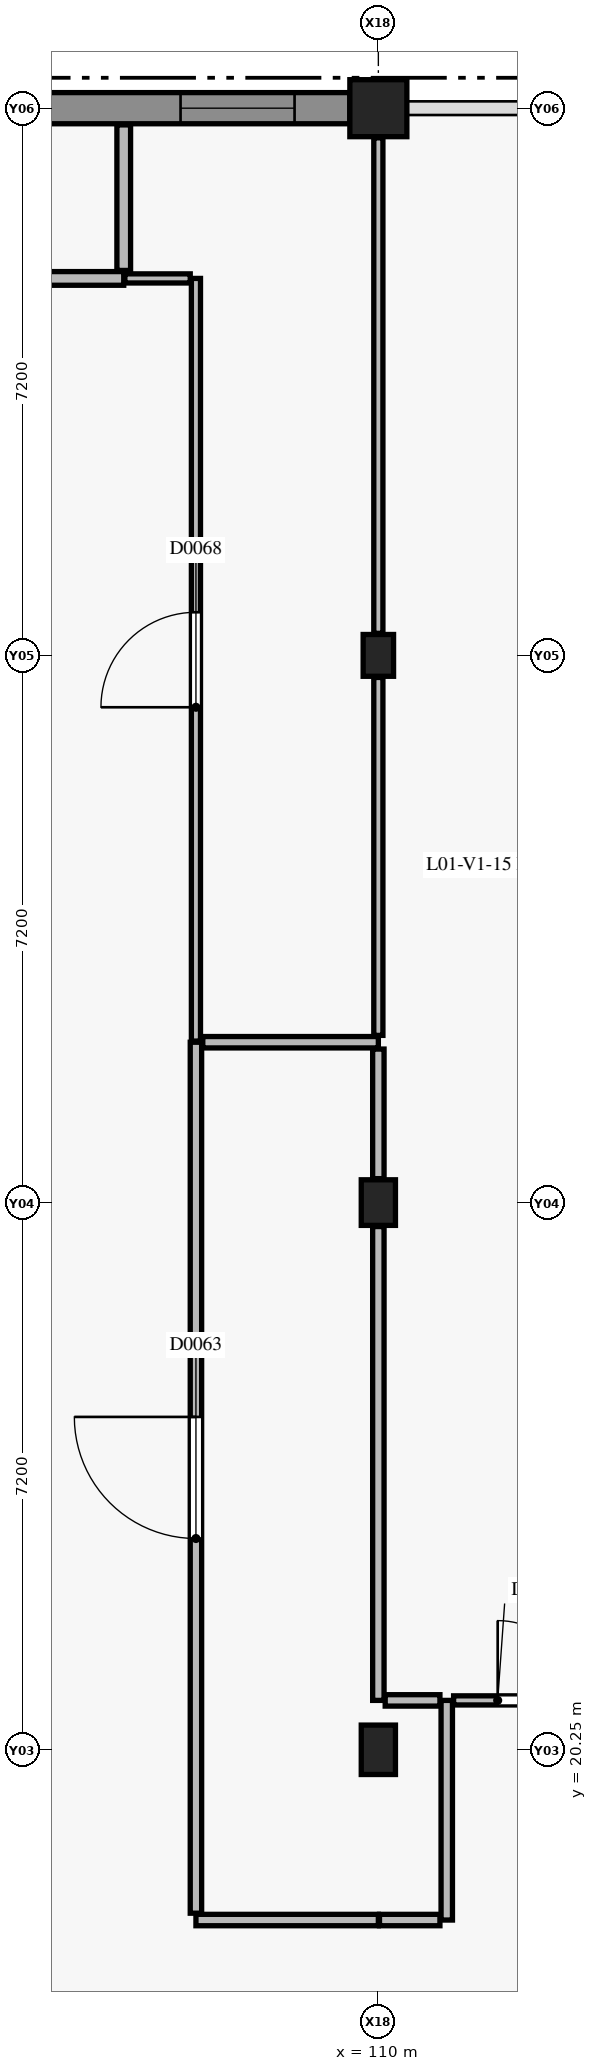
"""IFC4 building model, lengths in metres.
Left out: names, types, materials, properties, quantities, classifications, styles, units other than length and angle.
Written with IfcOpenShell. Run it as: python <this file> out.ifc"""

import sys

from ifc_helpers import new_model, si_unit, direction, frame, frame_2d, origin, origin_2d, place, context, subcontext, project, spatial, rectangle, extrude, element, fill, save


model = new_model("IFC4")
c1 = context("Model", 3, precision=1e-05, world=origin(), true_north=direction((0.0, 1.0)))
c2 = subcontext(c1, "Body", "Model", "MODEL_VIEW")
j1 = project(units=[si_unit("LENGTHUNIT", "METRE"), si_unit("PLANEANGLEUNIT", "RADIAN")], contexts=[c1])
p1 = place(None, origin())
s1 = spatial("IfcSite", under=j1, at=p1, CompositionType="ELEMENT")
p2 = place(p1, origin())
s2 = spatial("IfcBuilding", under=s1, at=p2, CompositionType="ELEMENT")
p3 = place(p2, frame((0.0, 0.0, 4.8)))
s3 = spatial("IfcBuildingStorey", under=s2, at=p3, CompositionType="ELEMENT", Elevation=4.8)
p4 = place(p3, frame((110.0, 20.25, 0.0), z_axis=(0.0, 0.0, 1.0), x_axis=(1.0, 0.0, 0.0)))
e1 = element("IfcColumn", 1, at=p4, inside=s3, PredefinedType="COLUMN", context=c2, shape_type="SweptSolid", body=[
    extrude(rectangle(XDim=0.45, YDim=0.65, at=origin_2d()), origin(), (0.0, 0.0, 1.0), 4.05),
])
p5 = place(p3, frame((110.0, 27.45, 0.0), z_axis=(0.0, 0.0, 1.0), x_axis=(1.0, 0.0, 0.0)))
e2 = element("IfcColumn", 2, at=p5, inside=s3, PredefinedType="COLUMN", context=c2, shape_type="SweptSolid", body=[
    extrude(rectangle(XDim=0.45, YDim=0.6, at=origin_2d()), origin(), (0.0, 0.0, 1.0), 4.05),
])
p6 = place(p3, frame((110.0, 34.65, 0.0), z_axis=(0.0, 0.0, 1.0), x_axis=(1.0, 0.0, 0.0)))
e3 = element("IfcColumn", 3, at=p6, inside=s3, PredefinedType="COLUMN", context=c2, shape_type="SweptSolid", body=[
    extrude(rectangle(XDim=0.4, YDim=0.55, at=origin_2d()), origin(), (0.0, 0.0, 1.0), 4.05),
])
p7 = place(p3, frame((110.0, 41.85, 0.0), z_axis=(0.0, 0.0, 1.0), x_axis=(1.0, 0.0, 0.0)))
e4 = element("IfcColumn", 4, at=p7, inside=s3, PredefinedType="COLUMN", context=c2, shape_type="SweptSolid", body=[
    extrude(rectangle(XDim=0.75, YDim=0.75, at=origin_2d()), origin(), (0.0, 0.0, 1.0), 4.36),
])
p8 = place(p3, frame((103.0, 41.85, 0.0), z_axis=(0.0, 0.0, 1.0), x_axis=(1.0, 0.0, 0.0)))
e5 = element("IfcWall", 5, at=p8, inside=s3, PredefinedType="USERDEFINED", context=c2, shape_type="SweptSolid", body=[
    extrude(rectangle(XDim=6.625, YDim=0.41, at=frame_2d((3.312, 0.0))), origin(), (0.0, 0.0, 1.0), 3.38),
])
p9 = place(p8, frame((1.215, 0.0, 0.9)))
e6 = element("IfcOpeningElement", 6, at=p9, cuts=e5, PredefinedType="OPENING", context=c2, shape_type="SweptSolid", body=[
    extrude(rectangle(XDim=1.2, YDim=1.5, at=frame_2d((0.6, 0.75))), frame((0.0, 0.215, 0.0), z_axis=(0.0, -1.0, 0.0), x_axis=(1.0, 0.0, 0.0)), (0.0, 0.0, 1.0), 0.43),
])
p10 = place(p8, frame((4.397, 0.0, 0.9)))
e7 = element("IfcOpeningElement", 7, at=p10, cuts=e5, PredefinedType="OPENING", context=c2, shape_type="SweptSolid", body=[
    extrude(rectangle(XDim=1.5, YDim=1.5, at=frame_2d((0.75, 0.75))), frame((0.0, 0.215, 0.0), z_axis=(0.0, -1.0, 0.0), x_axis=(1.0, 0.0, 0.0)), (0.0, 0.0, 1.0), 0.43),
])
p11 = place(p3, frame((105.2, 39.61, 0.0), z_axis=(0.0, 0.0, 1.0), x_axis=(1.0, 0.0, 0.0)))
e8 = element("IfcWall", 8, at=p11, inside=s3, PredefinedType="PLUMBINGWALL", context=c2, shape_type="SweptSolid", body=[
    extrude(rectangle(XDim=1.45, YDim=0.18, at=frame_2d((0.725, 0.0))), origin(), (0.0, 0.0, 1.0), 3.95),
])
p12 = place(p3, frame((107.6, 18.01, 0.0), z_axis=(0.0, 0.0, 1.0), x_axis=(1.0, 0.0, 0.0)))
e9 = element("IfcWall", 9, at=p12, inside=s3, PredefinedType="PARTITIONING", context=c2, shape_type="SweptSolid", body=[
    extrude(rectangle(XDim=2.4, YDim=0.15, at=frame_2d((1.2, 0.0))), origin(), (0.0, 0.0, 1.0), 3.95),
])
p13 = place(p3, frame((107.6, 18.1, 0.0), z_axis=(0.0, 0.0, 1.0), x_axis=(0.0, 1.0, 0.0)))
e10 = element("IfcWall", 10, at=p13, inside=s3, PredefinedType="PARTITIONING", context=c2, shape_type="SweptSolid", body=[
    extrude(rectangle(XDim=11.46, YDim=0.15, at=frame_2d((5.73, 0.0))), origin(), (0.0, 0.0, 1.0), 3.22),
])
p14 = place(p13, frame((4.93, 0.0, 0.0)))
e11 = element("IfcOpeningElement", 11, at=p14, cuts=e10, PredefinedType="OPENING", context=c2, shape_type="SweptSolid", body=[
    extrude(rectangle(XDim=1.6, YDim=2.25, at=frame_2d((0.8, 1.125))), frame((0.0, 0.085, 0.0), z_axis=(0.0, -1.0, 0.0), x_axis=(1.0, 0.0, 0.0)), (0.0, 0.0, 1.0), 0.17),
])
p15 = place(p3, frame((110.9, 18.01, 0.0), z_axis=(0.0, 0.0, 1.0), x_axis=(0.0, 1.0, 0.0)))
e12 = element("IfcWall", 12, at=p15, inside=s3, PredefinedType="PARTITIONING", context=c2, shape_type="SweptSolid", body=[
    extrude(rectangle(XDim=2.89, YDim=0.15, at=frame_2d((1.445, 0.0))), origin(), (0.0, 0.0, 1.0), 3.95),
])
p16 = place(p3, frame((110.015, 18.01, 0.0), z_axis=(0.0, 0.0, 1.0), x_axis=(1.0, 0.0, 0.0)))
e13 = element("IfcWall", 13, at=p16, inside=s3, PredefinedType="PARTITIONING", context=c2, shape_type="SweptSolid", body=[
    extrude(rectangle(XDim=0.795, YDim=0.15, at=frame_2d((0.397, 0.0))), origin(), (0.0, 0.0, 1.0), 3.95),
])
p17 = place(p3, frame((110.99, 20.9, 0.0), z_axis=(0.0, 0.0, 1.0), x_axis=(1.0, 0.0, 0.0)))
e14 = element("IfcWall", 14, at=p17, inside=s3, PredefinedType="PARTITIONING", context=c2, shape_type="SweptSolid", body=[
    extrude(rectangle(XDim=2.21, YDim=0.12, at=frame_2d((1.105, 0.0))), origin(), (0.0, 0.0, 1.0), 3.95),
])
p18 = place(p17, frame((0.58, 0.0, 0.0)))
e15 = element("IfcOpeningElement", 15, at=p18, cuts=e14, PredefinedType="OPENING", context=c2, shape_type="SweptSolid", body=[
    extrude(rectangle(XDim=1.05, YDim=2.15, at=frame_2d((0.525, 1.075))), frame((0.0, 0.07, 0.0), z_axis=(0.0, -1.0, 0.0), x_axis=(1.0, 0.0, 0.0)), (0.0, 0.0, 1.0), 0.14),
])
p19 = place(p3, frame((107.6, 29.575, 0.0), z_axis=(0.0, 0.0, 1.0), x_axis=(0.0, 1.0, 0.0)))
e16 = element("IfcWall", 16, at=p19, inside=s3, PredefinedType="PARTITIONING", context=c2, shape_type="SweptSolid", body=[
    extrude(rectangle(XDim=10.035, YDim=0.12, at=frame_2d((5.018, 0.0))), origin(), (0.0, 0.0, 1.0), 3.22),
])
p20 = place(p19, frame((4.393, 0.0, 0.0)))
e17 = element("IfcOpeningElement", 17, at=p20, cuts=e16, PredefinedType="OPENING", context=c2, shape_type="SweptSolid", body=[
    extrude(rectangle(XDim=1.25, YDim=2.15, at=frame_2d((0.625, 1.075))), frame((0.0, 0.07, 0.0), z_axis=(0.0, -1.0, 0.0), x_axis=(1.0, 0.0, 0.0)), (0.0, 0.0, 1.0), 0.14),
])
p21 = place(p3, frame((106.665, 39.61, 0.0), z_axis=(0.0, 0.0, 1.0), x_axis=(1.0, 0.0, 0.0)))
e18 = element("IfcWall", 18, at=p21, inside=s3, PredefinedType="PARTITIONING", context=c2, shape_type="SweptSolid", body=[
    extrude(rectangle(XDim=0.86, YDim=0.12, at=frame_2d((0.43, 0.0))), origin(), (0.0, 0.0, 1.0), 3.95),
])
p22 = place(p3, frame((106.65, 39.715, 0.0), z_axis=(0.0, 0.0, 1.0), x_axis=(0.0, 1.0, 0.0)))
e19 = element("IfcWall", 19, at=p22, inside=s3, PredefinedType="PLUMBINGWALL", context=c2, shape_type="SweptSolid", body=[
    extrude(rectangle(XDim=1.915, YDim=0.18, at=frame_2d((0.958, 0.0))), origin(), (0.0, 0.0, 1.0), 3.95),
])
p23 = place(p3, frame((107.69, 29.56, 0.0), z_axis=(0.0, 0.0, 1.0), x_axis=(1.0, 0.0, 0.0)))
e20 = element("IfcWall", 20, at=p23, inside=s3, PredefinedType="PARTITIONING", context=c2, shape_type="SweptSolid", body=[
    extrude(rectangle(XDim=2.31, YDim=0.15, at=frame_2d((1.155, 0.0))), origin(), (0.0, 0.0, 1.0), 3.95),
])
p24 = place(p3, frame((110.0, 20.9, 0.0), z_axis=(0.0, 0.0, 1.0), x_axis=(0.0, 1.0, 0.0)))
e21 = element("IfcWall", 21, at=p24, inside=s3, PredefinedType="PARTITIONING", context=c2, shape_type="SweptSolid", body=[
    extrude(rectangle(XDim=6.235, YDim=0.15, at=frame_2d((3.118, 0.0))), origin(), (0.0, 0.0, 1.0), 3.95),
])
p25 = place(p3, frame((110.0, 27.765, 0.0), z_axis=(0.0, 0.0, 1.0), x_axis=(0.0, 1.0, 0.0)))
e22 = element("IfcWall", 22, at=p25, inside=s3, PredefinedType="PARTITIONING", context=c2, shape_type="SweptSolid", body=[
    extrude(rectangle(XDim=1.705, YDim=0.15, at=frame_2d((0.853, 0.0))), origin(), (0.0, 0.0, 1.0), 3.95),
])
p26 = place(p3, frame((110.09, 20.9, 0.0), z_axis=(0.0, 0.0, 1.0), x_axis=(1.0, 0.0, 0.0)))
e23 = element("IfcWall", 23, at=p26, inside=s3, PredefinedType="PARTITIONING", context=c2, shape_type="SweptSolid", body=[
    extrude(rectangle(XDim=0.72, YDim=0.15, at=frame_2d((0.36, 0.0))), origin(), (0.0, 0.0, 1.0), 3.95),
])
p27 = place(p3, frame((110.0, 29.65, 0.0), z_axis=(0.0, 0.0, 1.0), x_axis=(0.0, 1.0, 0.0)))
e24 = element("IfcWall", 24, at=p27, inside=s3, PredefinedType="PARTITIONING", context=c2, shape_type="SweptSolid", body=[
    extrude(rectangle(XDim=4.71, YDim=0.12, at=frame_2d((2.355, 0.0))), origin(), (0.0, 0.0, 1.0), 3.95),
])
p28 = place(p3, frame((110.0, 34.94, 0.0), z_axis=(0.0, 0.0, 1.0), x_axis=(0.0, 1.0, 0.0)))
e25 = element("IfcWall", 25, at=p28, inside=s3, PredefinedType="PARTITIONING", context=c2, shape_type="SweptSolid", body=[
    extrude(rectangle(XDim=6.52, YDim=0.12, at=frame_2d((3.26, 0.0))), origin(), (0.0, 0.0, 1.0), 3.95),
])
p29 = place(p10, origin())
e26 = element("IfcWindow", 26, at=p29, inside=s3, PartitioningType="SINGLE_PANEL", PredefinedType="WINDOW", context=c2, shape_type="SweptSolid", body=[
    extrude(rectangle(XDim=1.5, YDim=1.5, at=frame_2d((0.75, 0.75))), frame((0.0, 0.03, 0.0), z_axis=(0.0, -1.0, 0.0), x_axis=(1.0, 0.0, 0.0)), (0.0, 0.0, 1.0), 0.06),
])
fill(e7, e26)
p30 = place(p14, origin())
e27 = element("IfcDoor", 27, at=p30, inside=s3, OperationType="SINGLE_SWING_RIGHT", PredefinedType="DOOR", context=c2, shape_type="SweptSolid", body=[
    extrude(rectangle(XDim=1.6, YDim=2.25, at=frame_2d((0.8, 1.125))), frame((0.0, 0.025, 0.0), z_axis=(0.0, -1.0, 0.0), x_axis=(1.0, 0.0, 0.0)), (0.0, 0.0, 1.0), 0.05),
])
fill(e11, e27)
p31 = place(p18, origin())
e28 = element("IfcDoor", 28, at=p31, inside=s3, OperationType="SINGLE_SWING_LEFT", PredefinedType="DOOR", context=c2, shape_type="SweptSolid", body=[
    extrude(rectangle(XDim=1.05, YDim=2.15, at=frame_2d((0.525, 1.075))), frame((0.0, 0.025, 0.0), z_axis=(0.0, -1.0, 0.0), x_axis=(1.0, 0.0, 0.0)), (0.0, 0.0, 1.0), 0.05),
])
fill(e15, e28)
p32 = place(p20, origin())
e29 = element("IfcDoor", 29, at=p32, inside=s3, OperationType="SINGLE_SWING_LEFT", PredefinedType="DOOR", context=c2, shape_type="SweptSolid", body=[
    extrude(rectangle(XDim=1.25, YDim=2.15, at=frame_2d((0.625, 1.075))), frame((0.0, 0.025, 0.0), z_axis=(0.0, -1.0, 0.0), x_axis=(1.0, 0.0, 0.0)), (0.0, 0.0, 1.0), 0.05),
])
fill(e17, e29)
save(model, sys.argv[1])
